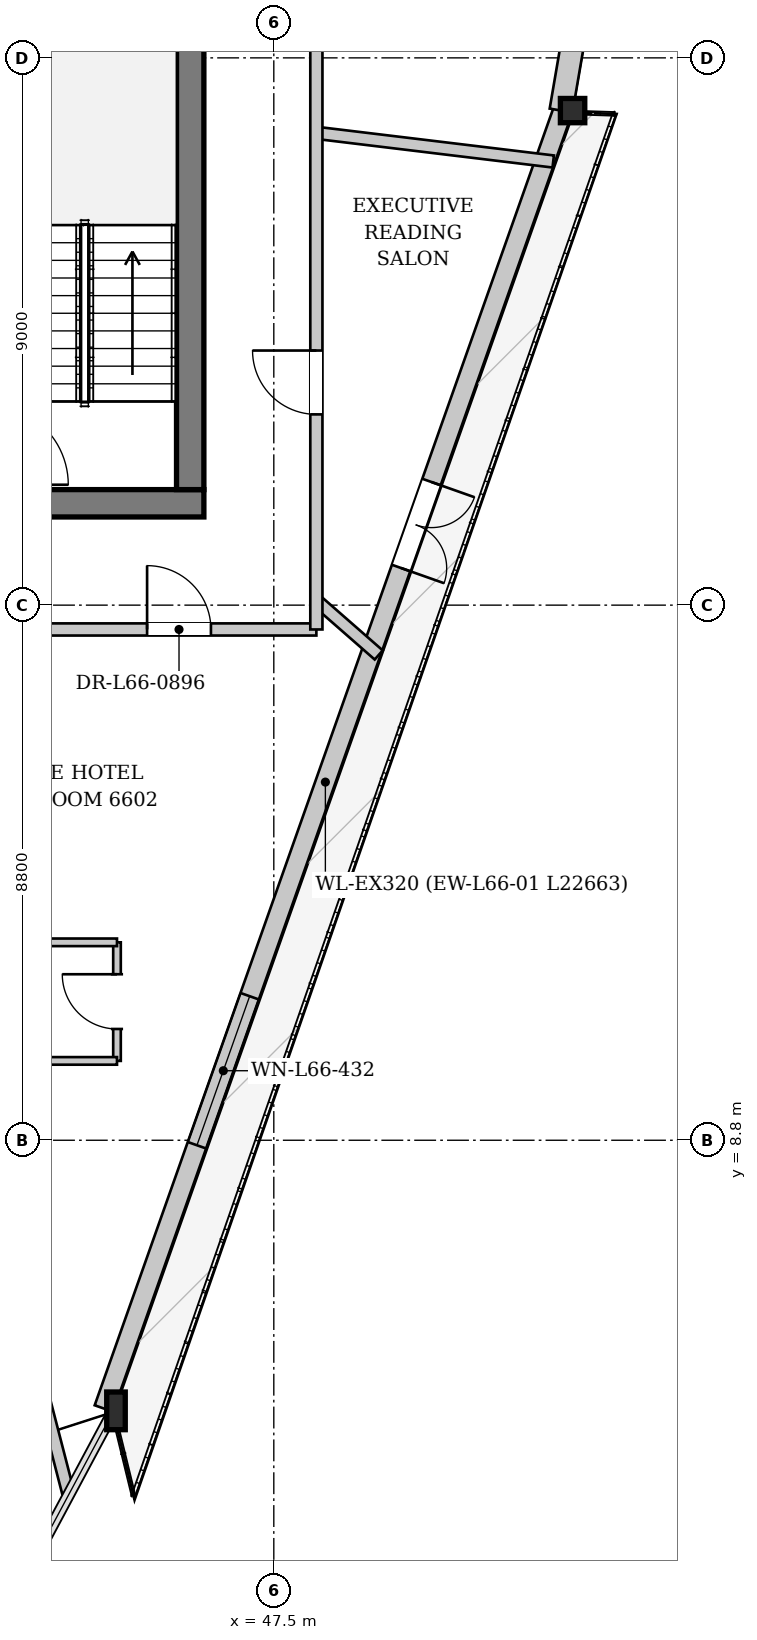
"""IFC4 building model, lengths in metres.
Left out: names, types, materials, properties, quantities, classifications, styles, units other than length and angle.
Written with IfcOpenShell. Run it as: python <this file> out.ifc"""

import sys

from ifc_helpers import new_model, si_unit, direction, frame, frame_2d, origin, origin_2d, place, context, subcontext, project, spatial, rectangle, i_section, extrude, source, transform, mapped, element, fill, save


model = new_model("IFC4")
c1 = context("Model", 3, precision=1e-05, world=origin(), true_north=direction((0.0, 1.0)))
c2 = subcontext(c1, "Body", "Model", "MODEL_VIEW")
j1 = project(units=[si_unit("LENGTHUNIT", "METRE"), si_unit("PLANEANGLEUNIT", "RADIAN")], contexts=[c1])
p1 = place(None, origin())
s1 = spatial("IfcSite", under=j1, at=p1, CompositionType="ELEMENT")
p2 = place(p1, origin())
s2 = spatial("IfcBuilding", under=s1, at=p2, CompositionType="ELEMENT")
p3 = place(p2, frame((0.0, 0.0, 248.9)))
s3 = spatial("IfcBuildingStorey", under=s2, at=p3, CompositionType="ELEMENT", Elevation=248.9)
m1 = source(origin(), c2, "Body", "SweptSolid", [
    extrude(i_section(OverallWidth=0.305, OverallDepth=0.62, WebThickness=0.021, FlangeThickness=0.04, at=origin_2d()), origin(), (0.0, 0.0, 1.0), 3.437),
])
p4 = place(p3, frame((44.856, 4.335, 0.0), z_axis=(0.02827474586, 0.008738175228, 0.999561995596), x_axis=(-0.295266430609, 0.955414954329, 0.0)))
e1 = element("IfcColumn", 1, at=p4, inside=s3, PredefinedType="COLUMN", context=c2, shape_type="MappedRepresentation", body=[
    mapped(m1, transform((0.0, 0.0, 0.0), x_axis=(1.0, 0.0, 0.0), y_axis=(0.0, 1.0, 0.0), z_axis=(0.0, 0.0, 1.0), scale=1.0)),
])
m2 = source(origin(), c2, "Body", "SweptSolid", [
    extrude(i_section(OverallWidth=0.401, OverallDepth=0.399, WebThickness=0.022, FlangeThickness=0.034, at=origin_2d()), origin(), (0.0, 0.0, 1.0), 3.436),
])
p5 = place(p3, frame((52.412, 25.701, 0.0), z_axis=(0.001065918288, 0.018333794545, 0.999831353677), x_axis=(-0.998314169879, 0.058041521505, 0.0)))
e2 = element("IfcColumn", 2, at=p5, inside=s3, PredefinedType="COLUMN", context=c2, shape_type="MappedRepresentation", body=[
    mapped(m2, transform((0.0, 0.0, 0.0), x_axis=(1.0, 0.0, 0.0), y_axis=(0.0, 1.0, 0.0), z_axis=(0.0, 0.0, 1.0), scale=1.0)),
])
p6 = place(p3, frame((52.261, 25.755, 0.0), z_axis=(0.0, 0.0, 1.0), x_axis=(-0.333397626213, -0.94278630815, 0.0)))
e3 = element("IfcWall", 3, at=p6, inside=s3, PredefinedType="SOLIDWALL", context=c2, shape_type="SweptSolid", body=[
    extrude(rectangle(XDim=22.663, YDim=0.32, at=frame_2d((11.332, 0.0))), origin(), (0.0, 0.0, 1.0), 2.872),
])
p7 = place(p6, frame((6.502, 0.0, 0.0)))
e4 = element("IfcOpeningElement", 4, at=p7, cuts=e3, PredefinedType="OPENING", context=c2, shape_type="SweptSolid", body=[
    extrude(rectangle(XDim=1.5, YDim=2.3, at=frame_2d((0.75, 1.15))), frame((0.0, 0.17, 0.0), z_axis=(0.0, -1.0, 0.0), x_axis=(1.0, 0.0, 0.0)), (0.0, 0.0, 1.0), 0.34),
])
p8 = place(p6, frame((15.471, 0.0, 0.402)))
e5 = element("IfcOpeningElement", 5, at=p8, cuts=e3, PredefinedType="OPENING", context=c2, shape_type="SweptSolid", body=[
    extrude(rectangle(XDim=2.6, YDim=2.35, at=frame_2d((1.3, 1.175))), frame((0.0, 0.17, 0.0), z_axis=(0.0, -1.0, 0.0), x_axis=(1.0, 0.0, 0.0)), (0.0, 0.0, 1.0), 0.34),
])
p9 = place(p3, frame((56.053, 48.071, 0.0), z_axis=(0.0, 0.0, 1.0), x_axis=(-0.168923450159, -0.985629173668, 0.0)))
e6 = element("IfcWall", 6, at=p9, inside=s3, PredefinedType="SOLIDWALL", context=c2, shape_type="SweptSolid", body=[
    extrude(rectangle(XDim=22.663, YDim=0.38, at=frame_2d((11.332, 0.0))), origin(), (0.0, 0.0, 1.0), 2.872),
])
p10 = place(p9, frame((5.746, 0.0, 0.65)))
e7 = element("IfcOpeningElement", 7, at=p10, cuts=e6, PredefinedType="OPENING", context=c2, shape_type="SweptSolid", body=[
    extrude(rectangle(XDim=1.2, YDim=1.5, at=frame_2d((0.6, 0.75))), frame((0.0, 0.2, 0.0), z_axis=(0.0, -1.0, 0.0), x_axis=(1.0, 0.0, 0.0)), (0.0, 0.0, 1.0), 0.4),
])
p11 = place(p9, frame((15.718, 0.0, 0.65)))
e8 = element("IfcOpeningElement", 8, at=p11, cuts=e6, PredefinedType="OPENING", context=c2, shape_type="SweptSolid", body=[
    extrude(rectangle(XDim=1.2, YDim=1.5, at=frame_2d((0.6, 0.75))), frame((0.0, 0.2, 0.0), z_axis=(0.0, -1.0, 0.0), x_axis=(1.0, 0.0, 0.0)), (0.0, 0.0, 1.0), 0.4),
])
p12 = place(p3, frame((46.35, 19.275, 0.0), z_axis=(0.0, 0.0, 1.0), x_axis=(-1.0, 0.0, 0.0)))
e9 = element("IfcWall", 9, at=p12, inside=s3, PredefinedType="SHEAR", context=c2, shape_type="SweptSolid", body=[
    extrude(rectangle(XDim=16.7, YDim=0.45, at=frame_2d((8.35, 0.0))), origin(), (0.0, 0.0, 1.0), 3.38),
])
p13 = place(p12, frame((4.55, 0.0, 0.0)))
e10 = element("IfcOpeningElement", 10, at=p13, cuts=e9, PredefinedType="OPENING", context=c2, shape_type="SweptSolid", body=[
    extrude(rectangle(XDim=1.12, YDim=2.25, at=frame_2d((0.56, 1.125))), frame((0.0, 0.235, 0.0), z_axis=(0.0, -1.0, 0.0), x_axis=(1.0, 0.0, 0.0)), (0.0, 0.0, 1.0), 0.47),
])
p14 = place(p12, frame((11.05, 0.0, 0.0)))
e11 = element("IfcOpeningElement", 11, at=p14, cuts=e9, PredefinedType="OPENING", context=c2, shape_type="SweptSolid", body=[
    extrude(rectangle(XDim=1.12, YDim=2.25, at=frame_2d((0.56, 1.125))), frame((0.0, 0.235, 0.0), z_axis=(0.0, -1.0, 0.0), x_axis=(1.0, 0.0, 0.0)), (0.0, 0.0, 1.0), 0.47),
])
p15 = place(p3, frame((46.125, 33.7, 0.0), z_axis=(0.0, 0.0, 1.0), x_axis=(0.0, -1.0, 0.0)))
e12 = element("IfcWall", 12, at=p15, inside=s3, PredefinedType="SHEAR", context=c2, shape_type="SweptSolid", body=[
    extrude(rectangle(XDim=14.2, YDim=0.45, at=frame_2d((7.1, 0.0))), origin(), (0.0, 0.0, 1.0), 3.38),
])
p16 = place(p15, frame((5.18, 0.0, 0.0)))
e13 = element("IfcOpeningElement", 13, at=p16, cuts=e12, PredefinedType="OPENING", context=c2, shape_type="SweptSolid", body=[
    extrude(rectangle(XDim=1.6, YDim=2.2, at=frame_2d((0.8, 1.1))), frame((0.0, 0.235, 0.0), z_axis=(0.0, -1.0, 0.0), x_axis=(1.0, 0.0, 0.0)), (0.0, 0.0, 1.0), 0.47),
])
p17 = place(p15, frame((2.05, 0.0, 0.0)))
e14 = element("IfcOpeningElement", 14, at=p17, cuts=e12, PredefinedType="OPENING", context=c2, shape_type="SweptSolid", body=[
    extrude(rectangle(XDim=0.95, YDim=2.1, at=frame_2d((0.475, 1.05))), frame((0.0, 0.235, 0.0), z_axis=(0.0, -1.0, 0.0), x_axis=(1.0, 0.0, 0.0)), (0.0, 0.0, 1.0), 0.47),
])
p18 = place(p3, frame((40.437, 17.2, 0.0), z_axis=(0.0, 0.0, 1.0), x_axis=(0.250981237111, -0.967991951732, 0.0)))
e15 = element("IfcWall", 15, at=p18, inside=s3, PredefinedType="PARTITIONING", context=c2, shape_type="SweptSolid", body=[
    extrude(rectangle(XDim=14.655, YDim=0.2, at=frame_2d((7.328, 0.0))), origin(), (0.0, 0.0, 1.0), 3.055),
])
p19 = place(p3, frame((48.2, 17.677, 0.0), z_axis=(0.0, 0.0, 1.0), x_axis=(0.752676622661, -0.658390387005, 0.0)))
e16 = element("IfcWall", 16, at=p19, inside=s3, PredefinedType="PARTITIONING", context=c2, shape_type="SweptSolid", body=[
    extrude(rectangle(XDim=1.362, YDim=0.2, at=frame_2d((0.681, 0.0))), origin(), (0.0, 0.0, 1.0), 3.38),
])
p20 = place(p3, frame((48.2, 25.367, 0.0), z_axis=(0.0, 0.0, 1.0), x_axis=(0.992770450303, -0.120028467479, 0.0)))
e17 = element("IfcWall", 17, at=p20, inside=s3, PredefinedType="PARTITIONING", context=c2, shape_type="SweptSolid", body=[
    extrude(rectangle(XDim=3.924, YDim=0.2, at=frame_2d((1.962, 0.0))), origin(), (0.0, 0.0, 1.0), 3.38),
])
p21 = place(p3, frame((44.921, 10.105, 0.0), z_axis=(0.0, 0.0, 1.0), x_axis=(0.0, 1.0, 0.0)))
e18 = element("IfcWall", 18, at=p21, inside=s3, PredefinedType="PARTITIONING", context=c2, shape_type="SweptSolid", body=[
    extrude(rectangle(XDim=1.95, YDim=0.125, at=frame_2d((0.975, 0.0))), origin(), (0.0, 0.0, 1.0), 3.38),
])
p22 = place(p21, frame((0.525, 0.0, 0.0)))
e19 = element("IfcOpeningElement", 19, at=p22, cuts=e18, PredefinedType="OPENING", context=c2, shape_type="SweptSolid", body=[
    extrude(rectangle(XDim=0.9, YDim=2.1, at=frame_2d((0.45, 1.05))), frame((0.0, 0.073, 0.0), z_axis=(0.0, -1.0, 0.0), x_axis=(1.0, 0.0, 0.0)), (0.0, 0.0, 1.0), 0.145),
])
for number, where, z_axis, x_axis in (
    (20, (44.921, 12.055, 0.0), (0.0, 0.0, 1.0), (-1.0, 0.0, 0.0)),
    (21, (42.521, 10.105, 0.0), (0.0, 0.0, 1.0), (1.0, 0.0, 0.0)),
):
    element("IfcWall", number, at=place(p3, frame(where, z_axis=z_axis, x_axis=x_axis)), inside=s3, PredefinedType="PARTITIONING", context=c2, shape_type="SweptSolid", body=[
        extrude(rectangle(XDim=2.4, YDim=0.125, at=frame_2d((1.2, 0.0))), origin(), (0.0, 0.0, 1.0), 3.38),
    ])
p23 = place(p3, frame((27.8, 17.2, 0.0), z_axis=(0.0, 0.0, 1.0), x_axis=(1.0, 0.0, 0.0)))
e22 = element("IfcWall", 22, at=p23, inside=s3, PredefinedType="PARTITIONING", context=c2, shape_type="SweptSolid", body=[
    extrude(rectangle(XDim=20.4, YDim=0.2, at=frame_2d((10.2, 0.0))), origin(), (0.0, 0.0, 1.0), 3.38),
])
p24 = place(p23, frame((9.291, 0.0, 0.0)))
e23 = element("IfcOpeningElement", 23, at=p24, cuts=e22, PredefinedType="OPENING", context=c2, shape_type="SweptSolid", body=[
    extrude(rectangle(XDim=1.05, YDim=2.2, at=frame_2d((0.525, 1.1))), frame((0.0, 0.11, 0.0), z_axis=(0.0, -1.0, 0.0), x_axis=(1.0, 0.0, 0.0)), (0.0, 0.0, 1.0), 0.22),
])
p25 = place(p23, frame((17.616, 0.0, 0.0)))
e24 = element("IfcOpeningElement", 24, at=p25, cuts=e22, PredefinedType="OPENING", context=c2, shape_type="SweptSolid", body=[
    extrude(rectangle(XDim=1.05, YDim=2.2, at=frame_2d((0.525, 1.1))), frame((0.0, 0.11, 0.0), z_axis=(0.0, -1.0, 0.0), x_axis=(1.0, 0.0, 0.0)), (0.0, 0.0, 1.0), 0.22),
])
p26 = place(p23, frame((0.361, 0.0, 0.0)))
e25 = element("IfcOpeningElement", 25, at=p26, cuts=e22, PredefinedType="OPENING", context=c2, shape_type="SweptSolid", body=[
    extrude(rectangle(XDim=1.05, YDim=2.2, at=frame_2d((0.525, 1.1))), frame((0.0, 0.11, 0.0), z_axis=(0.0, -1.0, 0.0), x_axis=(1.0, 0.0, 0.0)), (0.0, 0.0, 1.0), 0.22),
])
p27 = place(p3, frame((48.2, 17.2, 0.0), z_axis=(0.0, 0.0, 1.0), x_axis=(0.0, 1.0, 0.0)))
e26 = element("IfcWall", 26, at=p27, inside=s3, PredefinedType="PARTITIONING", context=c2, shape_type="SweptSolid", body=[
    extrude(rectangle(XDim=18.8, YDim=0.2, at=frame_2d((9.4, 0.0))), origin(), (0.0, 0.0, 1.0), 3.065),
])
p28 = place(p27, frame((3.537, 0.0, 0.0)))
e27 = element("IfcOpeningElement", 27, at=p28, cuts=e26, PredefinedType="OPENING", context=c2, shape_type="SweptSolid", body=[
    extrude(rectangle(XDim=1.05, YDim=2.2, at=frame_2d((0.525, 1.1))), frame((0.0, 0.11, 0.0), z_axis=(0.0, -1.0, 0.0), x_axis=(1.0, 0.0, 0.0)), (0.0, 0.0, 1.0), 0.22),
])
p29 = place(p27, frame((10.296, 0.0, 0.0)))
e28 = element("IfcOpeningElement", 28, at=p29, cuts=e26, PredefinedType="OPENING", context=c2, shape_type="SweptSolid", body=[
    extrude(rectangle(XDim=1.05, YDim=2.2, at=frame_2d((0.525, 1.1))), frame((0.0, 0.11, 0.0), z_axis=(0.0, -1.0, 0.0), x_axis=(1.0, 0.0, 0.0)), (0.0, 0.0, 1.0), 0.22),
])
m3 = source(origin(), c2, "Body", "SweptSolid", [
    extrude(rectangle(XDim=1.5, YDim=2.3, at=frame_2d((0.75, 1.15))), frame((0.0, 0.025, 0.0), z_axis=(0.0, -1.0, 0.0), x_axis=(1.0, 0.0, 0.0)), (0.0, 0.0, 1.0), 0.05),
])
p30 = place(p7, origin())
e29 = element("IfcDoor", 29, at=p30, inside=s3, OperationType="DOUBLE_DOOR_SINGLE_SWING", PredefinedType="DOOR", context=c2, shape_type="MappedRepresentation", body=[
    mapped(m3, transform((0.0, 0.0, 0.0), x_axis=(1.0, 0.0, 0.0), y_axis=(0.0, 1.0, 0.0), z_axis=(0.0, 0.0, 1.0), scale=1.0)),
])
fill(e4, e29)
m4 = source(origin(), c2, "Body", "SweptSolid", [
    extrude(rectangle(XDim=2.6, YDim=2.35, at=frame_2d((1.3, 1.175))), frame((0.0, 0.03, 0.0), z_axis=(0.0, -1.0, 0.0), x_axis=(1.0, 0.0, 0.0)), (0.0, 0.0, 1.0), 0.06),
])
p31 = place(p8, origin())
e30 = element("IfcWindow", 30, at=p31, inside=s3, PartitioningType="SINGLE_PANEL", PredefinedType="WINDOW", context=c2, shape_type="MappedRepresentation", body=[
    mapped(m4, transform((0.0, 0.0, 0.0), x_axis=(1.0, 0.0, 0.0), y_axis=(0.0, 1.0, 0.0), z_axis=(0.0, 0.0, 1.0), scale=1.0)),
])
fill(e5, e30)
m5 = source(origin(), c2, "Body", "SweptSolid", [
    extrude(rectangle(XDim=0.9, YDim=2.1, at=frame_2d((0.45, 1.05))), frame((0.0, 0.025, 0.0), z_axis=(0.0, -1.0, 0.0), x_axis=(1.0, 0.0, 0.0)), (0.0, 0.0, 1.0), 0.05),
])
p32 = place(p22, origin())
e31 = element("IfcDoor", 31, at=p32, inside=s3, OperationType="SINGLE_SWING_RIGHT", PredefinedType="DOOR", context=c2, shape_type="MappedRepresentation", body=[
    mapped(m5, transform((0.0, 0.0, 0.0), x_axis=(1.0, 0.0, 0.0), y_axis=(0.0, 1.0, 0.0), z_axis=(0.0, 0.0, 1.0), scale=1.0)),
])
fill(e19, e31)
m6 = source(origin(), c2, "Body", "SweptSolid", [
    extrude(rectangle(XDim=1.05, YDim=2.2, at=frame_2d((0.525, 1.1))), frame((0.0, 0.025, 0.0), z_axis=(0.0, -1.0, 0.0), x_axis=(1.0, 0.0, 0.0)), (0.0, 0.0, 1.0), 0.05),
])
p33 = place(p25, origin())
e32 = element("IfcDoor", 32, at=p33, inside=s3, OperationType="SINGLE_SWING_LEFT", PredefinedType="DOOR", context=c2, shape_type="MappedRepresentation", body=[
    mapped(m6, transform((0.0, 0.0, 0.0), x_axis=(1.0, 0.0, 0.0), y_axis=(0.0, 1.0, 0.0), z_axis=(0.0, 0.0, 1.0), scale=1.0)),
])
fill(e24, e32)
p34 = place(p28, origin())
e33 = element("IfcDoor", 33, at=p34, inside=s3, OperationType="SINGLE_SWING_RIGHT", PredefinedType="DOOR", context=c2, shape_type="MappedRepresentation", body=[
    mapped(m6, transform((0.0, 0.0, 0.0), x_axis=(1.0, 0.0, 0.0), y_axis=(0.0, 1.0, 0.0), z_axis=(0.0, 0.0, 1.0), scale=1.0)),
])
fill(e27, e33)
save(model, sys.argv[1])
